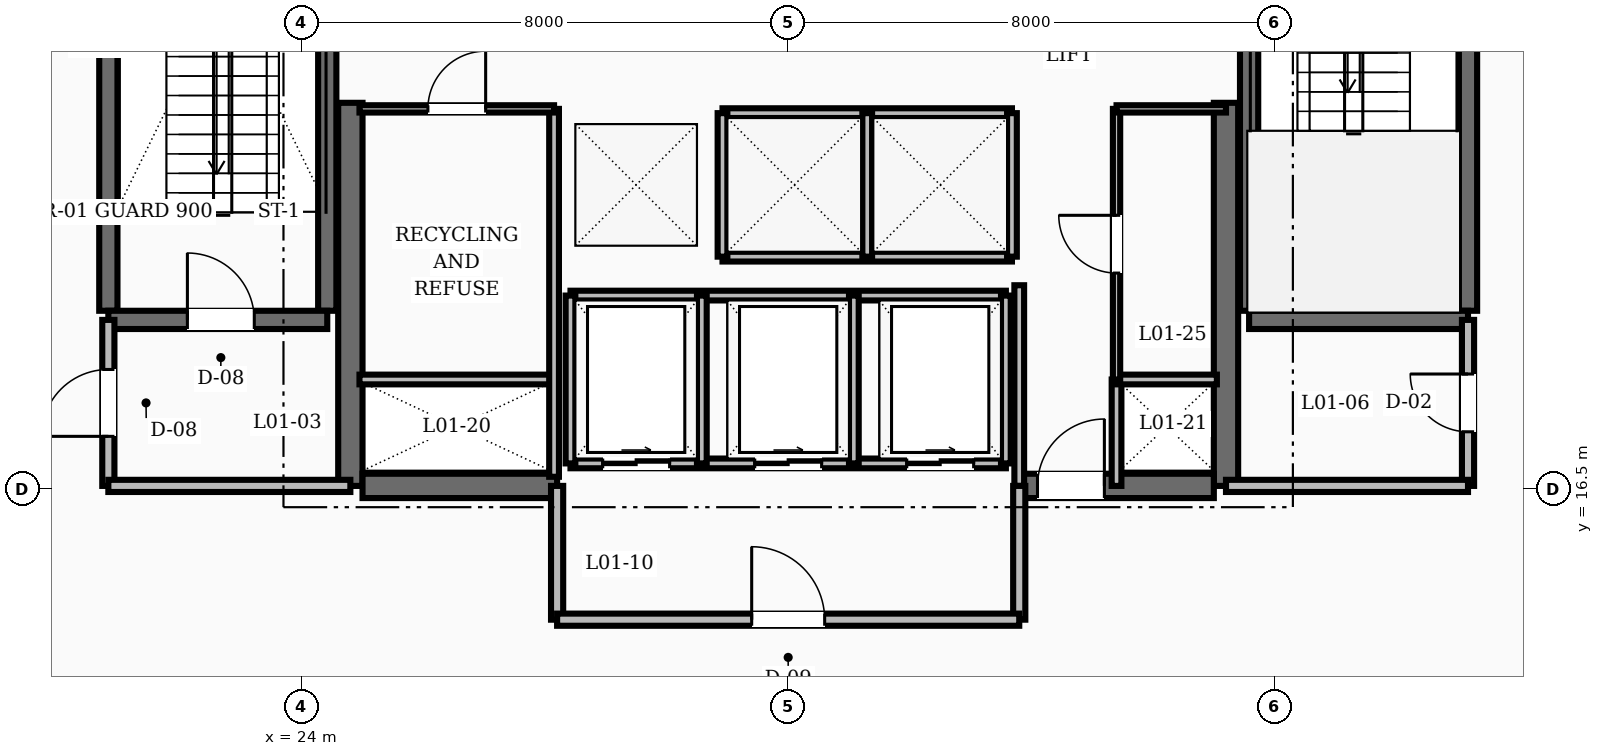
"""IFC4 building model, lengths in metres.
Left out: names, types, materials, properties, quantities, classifications, styles, units other than length and angle.
Written with IfcOpenShell. Run it as: python <this file> out.ifc"""

import sys

from ifc_helpers import new_model, si_unit, direction, frame, frame_2d, origin, place, context, subcontext, project, spatial, rectangle, extrude, element, fill, save


model = new_model("IFC4")
c1 = context("Model", 3, precision=1e-05, world=origin(), true_north=direction((0.0, 1.0)))
c2 = subcontext(c1, "Body", "Model", "MODEL_VIEW")
j1 = project(units=[si_unit("LENGTHUNIT", "METRE"), si_unit("PLANEANGLEUNIT", "RADIAN")], contexts=[c1])
p1 = place(None, origin())
s1 = spatial("IfcSite", under=j1, at=p1, CompositionType="ELEMENT")
p2 = place(p1, origin())
s2 = spatial("IfcBuilding", under=s1, at=p2, CompositionType="ELEMENT")
p3 = place(p2, frame((0.0, 0.0, 5.2)))
s3 = spatial("IfcBuildingStorey", under=s2, at=p3, CompositionType="ELEMENT", Elevation=5.2)
for number, where, z_axis, x_axis in (
    (1, (24.8, 16.55, 0.0), (0.0, 0.0, 1.0), (0.0, 1.0, 0.0)),
    (2, (39.2, 16.55, 0.0), (0.0, 0.0, 1.0), (0.0, 1.0, 0.0)),
):
    element("IfcWall", number, at=place(p3, frame(where, z_axis=z_axis, x_axis=x_axis)), inside=s3, PredefinedType="SHEAR", context=c2, shape_type="SweptSolid", body=[
        extrude(rectangle(XDim=6.3, YDim=0.4, at=frame_2d((3.15, 0.0))), origin(), (0.0, 0.0, 1.0), 4.8),
    ])
p4 = place(p3, frame((25.0, 16.55, 0.0), z_axis=(0.0, 0.0, 1.0), x_axis=(1.0, 0.0, 0.0)))
e3 = element("IfcWall", 3, at=p4, inside=s3, PredefinedType="SHEAR", context=c2, shape_type="SweptSolid", body=[
    extrude(rectangle(XDim=3.2, YDim=0.4, at=frame_2d((1.6, 0.0))), origin(), (0.0, 0.0, 1.0), 4.8),
])
p5 = place(p3, frame((35.8, 16.55, 0.0), z_axis=(0.0, 0.0, 1.0), x_axis=(1.0, 0.0, 0.0)))
e4 = element("IfcWall", 4, at=p5, inside=s3, PredefinedType="SHEAR", context=c2, shape_type="SweptSolid", body=[
    extrude(rectangle(XDim=3.2, YDim=0.4, at=frame_2d((1.6, 0.0))), origin(), (0.0, 0.0, 1.0), 4.8),
])
p6 = place(p5, frame((0.3, 0.0, 0.0)))
e5 = element("IfcOpeningElement", 5, at=p6, cuts=e4, PredefinedType="OPENING", context=c2, shape_type="SweptSolid", body=[
    extrude(rectangle(XDim=1.1, YDim=2.1, at=frame_2d((0.55, 1.05))), frame((0.0, 0.21, 0.0), z_axis=(0.0, -1.0, 0.0), x_axis=(1.0, 0.0, 0.0)), (0.0, 0.0, 1.0), 0.42),
])
for number, where, z_axis, x_axis in (
    (6, (20.82, 19.43, 0.0), (0.0, 0.0, 1.0), (0.0, 1.0, 0.0)),
    (7, (24.42, 19.43, 0.0), (0.0, 0.0, 1.0), (0.0, 1.0, 0.0)),
):
    element("IfcWall", number, at=place(p3, frame(where, z_axis=z_axis, x_axis=x_axis)), inside=s3, PredefinedType="SHEAR", context=c2, shape_type="SweptSolid", body=[
        extrude(rectangle(XDim=8.74, YDim=0.3, at=frame_2d((4.37, 0.0))), origin(), (0.0, 0.0, 1.0), 4.8),
    ])
p7 = place(p3, frame((20.82, 19.28, 0.0), z_axis=(0.0, 0.0, 1.0), x_axis=(1.0, 0.0, 0.0)))
e8 = element("IfcWall", 8, at=p7, inside=s3, PredefinedType="SHEAR", context=c2, shape_type="SweptSolid", body=[
    extrude(rectangle(XDim=3.6, YDim=0.3, at=frame_2d((1.8, 0.0))), origin(), (0.0, 0.0, 1.0), 4.8),
])
p8 = place(p7, frame((1.3, 0.0, 0.0)))
e9 = element("IfcOpeningElement", 9, at=p8, cuts=e8, PredefinedType="OPENING", context=c2, shape_type="SweptSolid", body=[
    extrude(rectangle(XDim=1.1, YDim=2.1, at=frame_2d((0.55, 1.05))), frame((0.0, 0.16, 0.0), z_axis=(0.0, -1.0, 0.0), x_axis=(1.0, 0.0, 0.0)), (0.0, 0.0, 1.0), 0.32),
])
for number, where, z_axis, x_axis in (
    (10, (43.18, 19.43, 0.0), (0.0, 0.0, 1.0), (0.0, 1.0, 0.0)),
    (11, (39.58, 19.43, 0.0), (0.0, 0.0, 1.0), (0.0, 1.0, 0.0)),
):
    element("IfcWall", number, at=place(p3, frame(where, z_axis=z_axis, x_axis=x_axis)), inside=s3, PredefinedType="SHEAR", context=c2, shape_type="SweptSolid", body=[
        extrude(rectangle(XDim=8.74, YDim=0.3, at=frame_2d((4.37, 0.0))), origin(), (0.0, 0.0, 1.0), 4.8),
    ])
p9 = place(p3, frame((39.58, 19.28, 0.0), z_axis=(0.0, 0.0, 1.0), x_axis=(1.0, 0.0, 0.0)))
e12 = element("IfcWall", 12, at=p9, inside=s3, PredefinedType="SHEAR", context=c2, shape_type="SweptSolid", body=[
    extrude(rectangle(XDim=3.6, YDim=0.3, at=frame_2d((1.8, 0.0))), origin(), (0.0, 0.0, 1.0), 4.8),
])
p10 = place(p3, frame((20.82, 16.55, 0.0), z_axis=(0.0, 0.0, 1.0), x_axis=(0.0, 1.0, 0.0)))
e13 = element("IfcWall", 13, at=p10, inside=s3, PredefinedType="SOLIDWALL", context=c2, shape_type="SweptSolid", body=[
    extrude(rectangle(XDim=2.73, YDim=0.2, at=frame_2d((1.365, 0.0))), origin(), (0.0, 0.0, 1.0), 3.52),
])
p11 = place(p10, frame((0.815, 0.0, 0.0)))
e14 = element("IfcOpeningElement", 14, at=p11, cuts=e13, PredefinedType="OPENING", context=c2, shape_type="SweptSolid", body=[
    extrude(rectangle(XDim=1.1, YDim=2.1, at=frame_2d((0.55, 1.05))), frame((0.0, 0.11, 0.0), z_axis=(0.0, -1.0, 0.0), x_axis=(1.0, 0.0, 0.0)), (0.0, 0.0, 1.0), 0.22),
])
p12 = place(p3, frame((20.82, 16.55, 0.0), z_axis=(0.0, 0.0, 1.0), x_axis=(1.0, 0.0, 0.0)))
e15 = element("IfcWall", 15, at=p12, inside=s3, PredefinedType="SOLIDWALL", context=c2, shape_type="SweptSolid", body=[
    extrude(rectangle(XDim=3.98, YDim=0.2, at=frame_2d((1.99, 0.0))), origin(), (0.0, 0.0, 1.0), 3.52),
])
p13 = place(p3, frame((43.18, 16.55, 0.0), z_axis=(0.0, 0.0, 1.0), x_axis=(0.0, 1.0, 0.0)))
e16 = element("IfcWall", 16, at=p13, inside=s3, PredefinedType="SOLIDWALL", context=c2, shape_type="SweptSolid", body=[
    extrude(rectangle(XDim=2.73, YDim=0.2, at=frame_2d((1.365, 0.0))), origin(), (0.0, 0.0, 1.0), 3.52),
])
p14 = place(p13, frame((0.89, 0.0, 0.0)))
e17 = element("IfcOpeningElement", 17, at=p14, cuts=e16, PredefinedType="OPENING", context=c2, shape_type="SweptSolid", body=[
    extrude(rectangle(XDim=0.95, YDim=2.1, at=frame_2d((0.475, 1.05))), frame((0.0, 0.11, 0.0), z_axis=(0.0, -1.0, 0.0), x_axis=(1.0, 0.0, 0.0)), (0.0, 0.0, 1.0), 0.22),
])
p15 = place(p3, frame((39.2, 16.55, 0.0), z_axis=(0.0, 0.0, 1.0), x_axis=(1.0, 0.0, 0.0)))
e18 = element("IfcWall", 18, at=p15, inside=s3, PredefinedType="SOLIDWALL", context=c2, shape_type="SweptSolid", body=[
    extrude(rectangle(XDim=3.98, YDim=0.2, at=frame_2d((1.99, 0.0))), origin(), (0.0, 0.0, 1.0), 3.52),
])
p16 = place(p3, frame((35.8, 16.55, 0.0), z_axis=(0.0, 0.0, 1.0), x_axis=(0.0, 1.0, 0.0)))
e19 = element("IfcWall", 19, at=p16, inside=s3, PredefinedType="SOLIDWALL", context=c2, shape_type="SweptSolid", body=[
    extrude(rectangle(XDim=3.3, YDim=0.16, at=frame_2d((1.65, 0.0))), origin(), (0.0, 0.0, 1.0), 3.52),
])
p17 = place(p3, frame((37.4, 16.55, 0.0), z_axis=(0.0, 0.0, 1.0), x_axis=(0.0, 1.0, 0.0)))
e20 = element("IfcWall", 20, at=p17, inside=s3, PredefinedType="SOLIDWALL", context=c2, shape_type="SweptSolid", body=[
    extrude(rectangle(XDim=1.75, YDim=0.16, at=frame_2d((0.875, 0.0))), origin(), (0.0, 0.0, 1.0), 3.52),
])
for number, where, z_axis, x_axis in (
    (21, (28.2, 14.35, 0.0), (0.0, 0.0, 1.0), (0.0, 1.0, 0.0)),
    (22, (35.8, 14.35, 0.0), (0.0, 0.0, 1.0), (0.0, 1.0, 0.0)),
):
    element("IfcWall", number, at=place(p3, frame(where, z_axis=z_axis, x_axis=x_axis)), inside=s3, PredefinedType="SOLIDWALL", context=c2, shape_type="SweptSolid", body=[
        extrude(rectangle(XDim=2.2, YDim=0.2, at=frame_2d((1.1, 0.0))), origin(), (0.0, 0.0, 1.0), 3.52),
    ])
p18 = place(p3, frame((28.2, 14.35, 0.0), z_axis=(0.0, 0.0, 1.0), x_axis=(1.0, 0.0, 0.0)))
e23 = element("IfcWall", 23, at=p18, inside=s3, PredefinedType="SOLIDWALL", context=c2, shape_type="SweptSolid", body=[
    extrude(rectangle(XDim=7.6, YDim=0.2, at=frame_2d((3.8, 0.0))), origin(), (0.0, 0.0, 1.0), 3.52),
])
p19 = place(p18, frame((3.2, 0.0, 0.0)))
e24 = element("IfcOpeningElement", 24, at=p19, cuts=e23, PredefinedType="OPENING", context=c2, shape_type="SweptSolid", body=[
    extrude(rectangle(XDim=1.2, YDim=2.1, at=frame_2d((0.6, 1.05))), frame((0.0, 0.11, 0.0), z_axis=(0.0, -1.0, 0.0), x_axis=(1.0, 0.0, 0.0)), (0.0, 0.0, 1.0), 0.22),
])
for number, where, z_axis, x_axis in (
    (25, (30.92, 22.68, 0.0), (0.0, 0.0, 1.0), (1.0, 0.0, 0.0)),
    (26, (30.92, 20.32, 0.0), (0.0, 0.0, 1.0), (1.0, 0.0, 0.0)),
):
    element("IfcWall", number, at=place(p3, frame(where, z_axis=z_axis, x_axis=x_axis)), inside=s3, PredefinedType="SOLIDWALL", context=c2, shape_type="SweptSolid", body=[
        extrude(rectangle(XDim=4.76, YDim=0.16, at=frame_2d((2.38, 0.0))), origin(), (0.0, 0.0, 1.0), 3.52),
    ])
for number, where, z_axis, x_axis in (
    (27, (30.92, 20.32, 0.0), (0.0, 0.0, 1.0), (0.0, 1.0, 0.0)),
    (28, (33.3, 20.32, 0.0), (0.0, 0.0, 1.0), (0.0, 1.0, 0.0)),
    (29, (35.68, 20.32, 0.0), (0.0, 0.0, 1.0), (0.0, 1.0, 0.0)),
):
    element("IfcWall", number, at=place(p3, frame(where, z_axis=z_axis, x_axis=x_axis)), inside=s3, PredefinedType="SOLIDWALL", context=c2, shape_type="SweptSolid", body=[
        extrude(rectangle(XDim=2.36, YDim=0.16, at=frame_2d((1.18, 0.0))), origin(), (0.0, 0.0, 1.0), 3.52),
    ])
p20 = place(p3, frame((28.42, 16.92, 0.0), z_axis=(0.0, 0.0, 1.0), x_axis=(1.0, 0.0, 0.0)))
e30 = element("IfcWall", 30, at=p20, inside=s3, PredefinedType="SOLIDWALL", context=c2, shape_type="SweptSolid", body=[
    extrude(rectangle(XDim=7.16, YDim=0.16, at=frame_2d((3.58, 0.0))), origin(), (0.0, 0.0, 1.0), 3.52),
])
p21 = place(p20, frame((0.53, 0.0, 0.0)))
e31 = element("IfcOpeningElement", 31, at=p21, cuts=e30, PredefinedType="OPENING", context=c2, shape_type="SweptSolid", body=[
    extrude(rectangle(XDim=1.1, YDim=2.15, at=frame_2d((0.55, 1.075))), frame((0.0, 0.09, 0.0), z_axis=(0.0, -1.0, 0.0), x_axis=(1.0, 0.0, 0.0)), (0.0, 0.0, 1.0), 0.18),
])
p22 = place(p20, frame((3.03, 0.0, 0.0)))
e32 = element("IfcOpeningElement", 32, at=p22, cuts=e30, PredefinedType="OPENING", context=c2, shape_type="SweptSolid", body=[
    extrude(rectangle(XDim=1.1, YDim=2.15, at=frame_2d((0.55, 1.075))), frame((0.0, 0.09, 0.0), z_axis=(0.0, -1.0, 0.0), x_axis=(1.0, 0.0, 0.0)), (0.0, 0.0, 1.0), 0.18),
])
p23 = place(p20, frame((5.53, 0.0, 0.0)))
e33 = element("IfcOpeningElement", 33, at=p23, cuts=e30, PredefinedType="OPENING", context=c2, shape_type="SweptSolid", body=[
    extrude(rectangle(XDim=1.1, YDim=2.15, at=frame_2d((0.55, 1.075))), frame((0.0, 0.09, 0.0), z_axis=(0.0, -1.0, 0.0), x_axis=(1.0, 0.0, 0.0)), (0.0, 0.0, 1.0), 0.18),
])
p24 = place(p3, frame((28.42, 19.68, 0.0), z_axis=(0.0, 0.0, 1.0), x_axis=(1.0, 0.0, 0.0)))
e34 = element("IfcWall", 34, at=p24, inside=s3, PredefinedType="SOLIDWALL", context=c2, shape_type="SweptSolid", body=[
    extrude(rectangle(XDim=7.16, YDim=0.16, at=frame_2d((3.58, 0.0))), origin(), (0.0, 0.0, 1.0), 3.52),
])
for number, where, z_axis, x_axis in (
    (35, (28.42, 16.92, 0.0), (0.0, 0.0, 1.0), (0.0, 1.0, 0.0)),
    (36, (30.58, 16.92, 0.0), (0.0, 0.0, 1.0), (0.0, 1.0, 0.0)),
    (37, (33.08, 16.92, 0.0), (0.0, 0.0, 1.0), (0.0, 1.0, 0.0)),
    (38, (35.58, 16.92, 0.0), (0.0, 0.0, 1.0), (0.0, 1.0, 0.0)),
):
    element("IfcWall", number, at=place(p3, frame(where, z_axis=z_axis, x_axis=x_axis)), inside=s3, PredefinedType="SOLIDWALL", context=c2, shape_type="SweptSolid", body=[
        extrude(rectangle(XDim=2.76, YDim=0.16, at=frame_2d((1.38, 0.0))), origin(), (0.0, 0.0, 1.0), 3.52),
    ])
p25 = place(p3, frame((24.95, 18.3, 0.0), z_axis=(0.0, 0.0, 1.0), x_axis=(1.0, 0.0, 0.0)))
e39 = element("IfcWall", 39, at=p25, inside=s3, PredefinedType="SOLIDWALL", context=c2, shape_type="SweptSolid", body=[
    extrude(rectangle(XDim=3.2, YDim=0.16, at=frame_2d((1.6, 0.0))), origin(), (0.0, 0.0, 1.0), 3.52),
])
p26 = place(p3, frame((28.15, 16.7, 0.0), z_axis=(0.0, 0.0, 1.0), x_axis=(0.0, 1.0, 0.0)))
e40 = element("IfcWall", 40, at=p26, inside=s3, PredefinedType="SOLIDWALL", context=c2, shape_type="SweptSolid", body=[
    extrude(rectangle(XDim=6.05, YDim=0.16, at=frame_2d((3.025, 0.0))), origin(), (0.0, 0.0, 1.0), 3.52),
])
p27 = place(p3, frame((37.4, 18.3, 0.0), z_axis=(0.0, 0.0, 1.0), x_axis=(1.0, 0.0, 0.0)))
e41 = element("IfcWall", 41, at=p27, inside=s3, PredefinedType="SOLIDWALL", context=c2, shape_type="SweptSolid", body=[
    extrude(rectangle(XDim=1.65, YDim=0.16, at=frame_2d((0.825, 0.0))), origin(), (0.0, 0.0, 1.0), 3.52),
])
p28 = place(p3, frame((24.95, 22.75, 0.0), z_axis=(0.0, 0.0, 1.0), x_axis=(1.0, 0.0, 0.0)))
e42 = element("IfcWall", 42, at=p28, inside=s3, PredefinedType="PARTITIONING", context=c2, shape_type="SweptSolid", body=[
    extrude(rectangle(XDim=3.2, YDim=0.12, at=frame_2d((1.6, 0.0))), origin(), (0.0, 0.0, 1.0), 3.52),
])
p29 = place(p28, frame((1.125, 0.0, 0.0)))
e43 = element("IfcOpeningElement", 43, at=p29, cuts=e42, PredefinedType="OPENING", context=c2, shape_type="SweptSolid", body=[
    extrude(rectangle(XDim=0.95, YDim=2.1, at=frame_2d((0.475, 1.05))), frame((0.0, 0.07, 0.0), z_axis=(0.0, -1.0, 0.0), x_axis=(1.0, 0.0, 0.0)), (0.0, 0.0, 1.0), 0.14),
])
p30 = place(p3, frame((37.4, 18.3, 0.0), z_axis=(0.0, 0.0, 1.0), x_axis=(0.0, 1.0, 0.0)))
e44 = element("IfcWall", 44, at=p30, inside=s3, PredefinedType="PARTITIONING", context=c2, shape_type="SweptSolid", body=[
    extrude(rectangle(XDim=4.45, YDim=0.12, at=frame_2d((2.225, 0.0))), origin(), (0.0, 0.0, 1.0), 3.52),
])
p31 = place(p30, frame((1.75, 0.0, 0.0)))
e45 = element("IfcOpeningElement", 45, at=p31, cuts=e44, PredefinedType="OPENING", context=c2, shape_type="SweptSolid", body=[
    extrude(rectangle(XDim=0.95, YDim=2.1, at=frame_2d((0.475, 1.05))), frame((0.0, 0.07, 0.0), z_axis=(0.0, -1.0, 0.0), x_axis=(1.0, 0.0, 0.0)), (0.0, 0.0, 1.0), 0.14),
])
p32 = place(p3, frame((37.4, 22.75, 0.0), z_axis=(0.0, 0.0, 1.0), x_axis=(1.0, 0.0, 0.0)))
e46 = element("IfcWall", 46, at=p32, inside=s3, PredefinedType="PARTITIONING", context=c2, shape_type="SweptSolid", body=[
    extrude(rectangle(XDim=1.8, YDim=0.12, at=frame_2d((0.9, 0.0))), origin(), (0.0, 0.0, 1.0), 3.52),
])
p33 = place(p8, origin())
e47 = element("IfcDoor", 47, at=p33, inside=s3, OperationType="SINGLE_SWING_LEFT", PredefinedType="DOOR", context=c2, shape_type="SweptSolid", body=[
    extrude(rectangle(XDim=1.1, YDim=2.1, at=frame_2d((0.55, 1.05))), frame((0.0, 0.025, 0.0), z_axis=(0.0, -1.0, 0.0), x_axis=(1.0, 0.0, 0.0)), (0.0, 0.0, 1.0), 0.05),
])
fill(e9, e47)
p34 = place(p11, origin())
e48 = element("IfcDoor", 48, at=p34, inside=s3, OperationType="SINGLE_SWING_LEFT", PredefinedType="DOOR", context=c2, shape_type="SweptSolid", body=[
    extrude(rectangle(XDim=1.1, YDim=2.1, at=frame_2d((0.55, 1.05))), frame((0.0, 0.025, 0.0), z_axis=(0.0, -1.0, 0.0), x_axis=(1.0, 0.0, 0.0)), (0.0, 0.0, 1.0), 0.05),
])
fill(e14, e48)
p35 = place(p14, origin())
e49 = element("IfcDoor", 49, at=p35, inside=s3, OperationType="SINGLE_SWING_RIGHT", PredefinedType="DOOR", context=c2, shape_type="SweptSolid", body=[
    extrude(rectangle(XDim=0.95, YDim=2.1, at=frame_2d((0.475, 1.05))), frame((0.0, 0.025, 0.0), z_axis=(0.0, -1.0, 0.0), x_axis=(1.0, 0.0, 0.0)), (0.0, 0.0, 1.0), 0.05),
])
fill(e17, e49)
p36 = place(p6, origin())
e50 = element("IfcDoor", 50, at=p36, inside=s3, OperationType="SINGLE_SWING_RIGHT", PredefinedType="DOOR", context=c2, shape_type="SweptSolid", body=[
    extrude(rectangle(XDim=1.1, YDim=2.1, at=frame_2d((0.55, 1.05))), frame((0.0, 0.025, 0.0), z_axis=(0.0, -1.0, 0.0), x_axis=(1.0, 0.0, 0.0)), (0.0, 0.0, 1.0), 0.05),
])
fill(e5, e50)
p37 = place(p19, origin())
e51 = element("IfcDoor", 51, at=p37, inside=s3, OperationType="SINGLE_SWING_LEFT", PredefinedType="DOOR", context=c2, shape_type="SweptSolid", body=[
    extrude(rectangle(XDim=1.2, YDim=2.1, at=frame_2d((0.6, 1.05))), frame((0.0, 0.025, 0.0), z_axis=(0.0, -1.0, 0.0), x_axis=(1.0, 0.0, 0.0)), (0.0, 0.0, 1.0), 0.05),
])
fill(e24, e51)
p38 = place(p21, origin())
e52 = element("IfcDoor", 52, at=p38, inside=s3, OperationType="SLIDING_TO_RIGHT", PredefinedType="DOOR", context=c2, shape_type="SweptSolid", body=[
    extrude(rectangle(XDim=1.1, YDim=2.15, at=frame_2d((0.55, 1.075))), frame((0.0, 0.025, 0.0), z_axis=(0.0, -1.0, 0.0), x_axis=(1.0, 0.0, 0.0)), (0.0, 0.0, 1.0), 0.05),
])
fill(e31, e52)
p39 = place(p22, origin())
e53 = element("IfcDoor", 53, at=p39, inside=s3, OperationType="SLIDING_TO_RIGHT", PredefinedType="DOOR", context=c2, shape_type="SweptSolid", body=[
    extrude(rectangle(XDim=1.1, YDim=2.15, at=frame_2d((0.55, 1.075))), frame((0.0, 0.025, 0.0), z_axis=(0.0, -1.0, 0.0), x_axis=(1.0, 0.0, 0.0)), (0.0, 0.0, 1.0), 0.05),
])
fill(e32, e53)
p40 = place(p23, origin())
e54 = element("IfcDoor", 54, at=p40, inside=s3, OperationType="SLIDING_TO_RIGHT", PredefinedType="DOOR", context=c2, shape_type="SweptSolid", body=[
    extrude(rectangle(XDim=1.1, YDim=2.15, at=frame_2d((0.55, 1.075))), frame((0.0, 0.025, 0.0), z_axis=(0.0, -1.0, 0.0), x_axis=(1.0, 0.0, 0.0)), (0.0, 0.0, 1.0), 0.05),
])
fill(e33, e54)
p41 = place(p29, origin())
e55 = element("IfcDoor", 55, at=p41, inside=s3, OperationType="SINGLE_SWING_RIGHT", PredefinedType="DOOR", context=c2, shape_type="SweptSolid", body=[
    extrude(rectangle(XDim=0.95, YDim=2.1, at=frame_2d((0.475, 1.05))), frame((0.0, 0.025, 0.0), z_axis=(0.0, -1.0, 0.0), x_axis=(1.0, 0.0, 0.0)), (0.0, 0.0, 1.0), 0.05),
])
fill(e43, e55)
p42 = place(p31, origin())
e56 = element("IfcDoor", 56, at=p42, inside=s3, OperationType="SINGLE_SWING_RIGHT", PredefinedType="DOOR", context=c2, shape_type="SweptSolid", body=[
    extrude(rectangle(XDim=0.95, YDim=2.1, at=frame_2d((0.475, 1.05))), frame((0.0, 0.025, 0.0), z_axis=(0.0, -1.0, 0.0), x_axis=(1.0, 0.0, 0.0)), (0.0, 0.0, 1.0), 0.05),
])
fill(e45, e56)
save(model, sys.argv[1])
